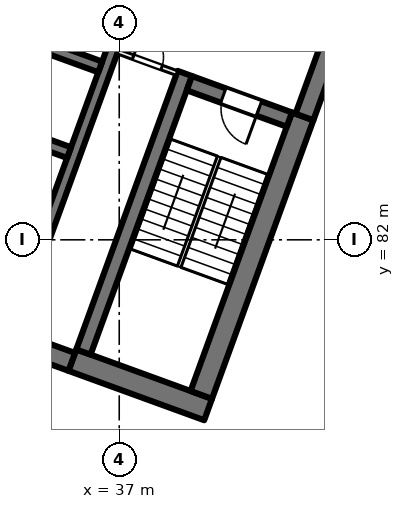
"""IFC4 building model, lengths in metres.
Left out: names, types, materials, properties, quantities, classifications, styles, units other than length and angle.
Written with IfcOpenShell. Run it as: python <this file> out.ifc"""

import sys

from ifc_helpers import new_model, si_unit, direction, frame, frame_2d, origin, place, context, subcontext, project, spatial, rectangle, extrude, element, fill, save


model = new_model("IFC4")
c1 = context("Model", 3, precision=1e-05, world=origin(), true_north=direction((0.0, 1.0)))
c2 = subcontext(c1, "Body", "Model", "MODEL_VIEW")
j1 = project(units=[si_unit("LENGTHUNIT", "METRE"), si_unit("PLANEANGLEUNIT", "RADIAN")], contexts=[c1])
p1 = place(None, origin())
s1 = spatial("IfcSite", under=j1, at=p1, CompositionType="ELEMENT")
p2 = place(p1, origin())
s2 = spatial("IfcBuilding", under=s1, at=p2, CompositionType="ELEMENT")
p3 = place(p2, frame((0.0, 0.0, 228.0)))
s3 = spatial("IfcBuildingStorey", under=s2, at=p3, CompositionType="ELEMENT", Elevation=228.0)
p4 = place(p3, frame((39.338, 77.535, 0.0), z_axis=(0.0, 0.0, 1.0), x_axis=(-0.939701471648, 0.341995824804, 0.0)))
e1 = element("IfcWall", 1, at=p4, inside=s3, PredefinedType="SHEAR", context=c2, shape_type="SweptSolid", body=[
    extrude(rectangle(XDim=3.8, YDim=0.6, at=frame_2d((1.9, 0.0))), origin(), (0.0, 0.0, 1.0), 4.0),
])
p5 = place(p3, frame((35.75, 78.788, 0.0), z_axis=(0.0, 0.0, 1.0), x_axis=(-0.939692894512, 0.342019391267, 0.0)))
e2 = element("IfcWall", 2, at=p5, inside=s3, PredefinedType="SHEAR", context=c2, shape_type="SweptSolid", body=[
    extrude(rectangle(XDim=14.4, YDim=0.5, at=frame_2d((7.2, 0.0))), origin(), (0.0, 0.0, 1.0), 4.0),
])
p6 = place(p3, frame((39.159, 77.92, 0.0), z_axis=(0.0, 0.0, 1.0), x_axis=(0.342016982193, 0.939693771338, 0.0)))
e3 = element("IfcWall", 3, at=p6, inside=s3, PredefinedType="SHEAR", context=c2, shape_type="SweptSolid", body=[
    extrude(rectangle(XDim=7.8, YDim=0.6, at=frame_2d((3.9, 0.0))), origin(), (0.0, 0.0, 1.0), 4.0),
])
p7 = place(p3, frame((41.874, 85.232, 0.0), z_axis=(0.0, 0.0, 1.0), x_axis=(0.342020437038, 0.939692513883, 0.0)))
e4 = element("IfcWall", 4, at=p7, inside=s3, PredefinedType="SHEAR", context=c2, shape_type="SweptSolid", body=[
    extrude(rectangle(XDim=8.975, YDim=0.5, at=frame_2d((4.487, 0.0))), origin(), (0.0, 0.0, 1.0), 4.0),
])
p8 = place(p3, frame((36.058, 79.048, 0.0), z_axis=(0.0, 0.0, 1.0), x_axis=(0.342016982193, 0.939693771338, 0.0)))
e5 = element("IfcWall", 5, at=p8, inside=s3, PredefinedType="SHEAR", context=c2, shape_type="SweptSolid", body=[
    extrude(rectangle(XDim=7.8, YDim=0.4, at=frame_2d((3.9, 0.0))), origin(), (0.0, 0.0, 1.0), 4.0),
])
p9 = place(p3, frame((41.476, 85.164, 0.0), z_axis=(0.0, 0.0, 1.0), x_axis=(-0.939678810556, 0.342058084236, 0.0)))
e6 = element("IfcWall", 6, at=p9, inside=s3, PredefinedType="SHEAR", context=c2, shape_type="SweptSolid", body=[
    extrude(rectangle(XDim=2.8, YDim=0.4, at=frame_2d((1.4, 0.0))), origin(), (0.0, 0.0, 1.0), 4.0),
])
p10 = place(p9, frame((0.85, 0.0, 0.0)))
e7 = element("IfcOpeningElement", 7, at=p10, cuts=e6, PredefinedType="OPENING", context=c2, shape_type="SweptSolid", body=[
    extrude(rectangle(XDim=1.0, YDim=2.1, at=frame_2d((0.5, 1.05))), frame((0.0, 0.21, 0.0), z_axis=(0.0, -1.0, 0.0), x_axis=(1.0, 0.0, 0.0)), (0.0, 0.0, 1.0), 0.42),
])
p11 = place(p3, frame((30.949, 80.801, 0.0), z_axis=(0.0, 0.0, 1.0), x_axis=(0.342016684409, 0.939693879721, 0.0)))
e8 = element("IfcWall", 8, at=p11, inside=s3, PredefinedType="SHEAR", context=c2, shape_type="SweptSolid", body=[
    extrude(rectangle(XDim=12.25, YDim=0.3, at=frame_2d((6.125, 0.0))), origin(), (0.0, 0.0, 1.0), 4.0),
])
p12 = place(p11, frame((0.9, 0.0, 0.0)))
e9 = element("IfcOpeningElement", 9, at=p12, cuts=e8, PredefinedType="OPENING", context=c2, shape_type="SweptSolid", body=[
    extrude(rectangle(XDim=0.8, YDim=2.1, at=frame_2d((0.4, 1.05))), frame((0.0, 0.16, 0.0), z_axis=(0.0, -1.0, 0.0), x_axis=(1.0, 0.0, 0.0)), (0.0, 0.0, 1.0), 0.32),
])
p13 = place(p11, frame((5.7, 0.0, 0.0)))
e10 = element("IfcOpeningElement", 10, at=p13, cuts=e8, PredefinedType="OPENING", context=c2, shape_type="SweptSolid", body=[
    extrude(rectangle(XDim=0.8, YDim=2.1, at=frame_2d((0.4, 1.05))), frame((0.0, 0.16, 0.0), z_axis=(0.0, -1.0, 0.0), x_axis=(1.0, 0.0, 0.0)), (0.0, 0.0, 1.0), 0.32),
])
p14 = place(p3, frame((34.144, 79.638, 0.0), z_axis=(0.0, 0.0, 1.0), x_axis=(0.342016684409, 0.939693879721, 0.0)))
e11 = element("IfcWall", 11, at=p14, inside=s3, PredefinedType="SHEAR", context=c2, shape_type="SweptSolid", body=[
    extrude(rectangle(XDim=12.25, YDim=0.3, at=frame_2d((6.125, 0.0))), origin(), (0.0, 0.0, 1.0), 4.0),
])
p15 = place(p3, frame((35.679, 84.294, 0.0), z_axis=(0.0, 0.0, 1.0), x_axis=(-0.939706007505, 0.341983361377, 0.0)))
e12 = element("IfcWall", 12, at=p15, inside=s3, PredefinedType="SHEAR", context=c2, shape_type="SweptSolid", body=[
    extrude(rectangle(XDim=3.1, YDim=0.3, at=frame_2d((1.55, 0.0))), origin(), (0.0, 0.0, 1.0), 4.0),
])
p16 = place(p3, frame((36.5, 86.549, 0.0), z_axis=(0.0, 0.0, 1.0), x_axis=(-0.939689908313, 0.342027595692, 0.0)))
e13 = element("IfcWall", 13, at=p16, inside=s3, PredefinedType="SHEAR", context=c2, shape_type="SweptSolid", body=[
    extrude(rectangle(XDim=3.1, YDim=0.3, at=frame_2d((1.55, 0.0))), origin(), (0.0, 0.0, 1.0), 4.0),
])
p17 = place(p3, frame((36.966, 86.952, 0.0), z_axis=(0.0, 0.0, 1.0), x_axis=(0.939672407396, -0.342075674051, 0.0)))
e14 = element("IfcWall", 14, at=p17, inside=s3, PredefinedType="PARTITIONING", context=c2, shape_type="SweptSolid", body=[
    extrude(rectangle(XDim=1.65, YDim=0.125, at=frame_2d((0.825, 0.0))), origin(), (0.0, 0.0, 1.0), 3.625),
])
p18 = place(p17, frame((0.425, 0.0, 0.0)))
e15 = element("IfcOpeningElement", 15, at=p18, cuts=e14, PredefinedType="OPENING", context=c2, shape_type="SweptSolid", body=[
    extrude(rectangle(XDim=0.8, YDim=2.1, at=frame_2d((0.4, 1.05))), frame((0.0, 0.073, 0.0), z_axis=(0.0, -1.0, 0.0), x_axis=(1.0, 0.0, 0.0)), (0.0, 0.0, 1.0), 0.145),
])
p19 = place(p10, origin())
e16 = element("IfcDoor", 16, at=p19, inside=s3, OperationType="SINGLE_SWING_RIGHT", PredefinedType="DOOR", context=c2, shape_type="SweptSolid", body=[
    extrude(rectangle(XDim=1.0, YDim=2.1, at=frame_2d((0.5, 1.05))), frame((0.0, 0.025, 0.0), z_axis=(0.0, -1.0, 0.0), x_axis=(1.0, 0.0, 0.0)), (0.0, 0.0, 1.0), 0.05),
])
fill(e7, e16)
p20 = place(p18, origin())
e17 = element("IfcDoor", 17, at=p20, inside=s3, OperationType="SINGLE_SWING_LEFT", PredefinedType="DOOR", context=c2, shape_type="SweptSolid", body=[
    extrude(rectangle(XDim=0.8, YDim=2.1, at=frame_2d((0.4, 1.05))), frame((0.0, 0.025, 0.0), z_axis=(0.0, -1.0, 0.0), x_axis=(1.0, 0.0, 0.0)), (0.0, 0.0, 1.0), 0.05),
])
fill(e15, e17)
save(model, sys.argv[1])
